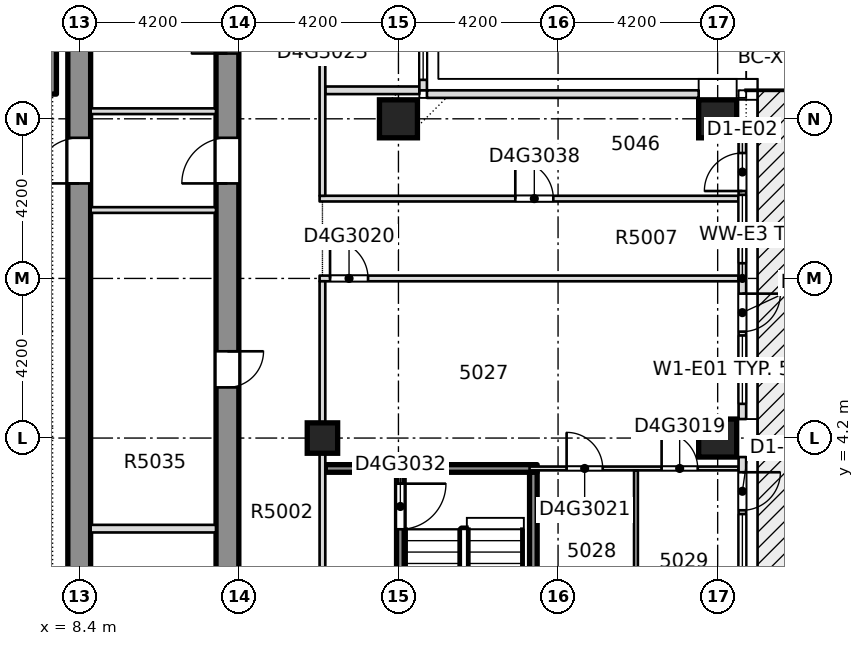
"""IFC4 building model, lengths in metres.
Left out: names, types, materials, properties, quantities, classifications, styles, units other than length and angle.
Written with IfcOpenShell. Run it as: python <this file> out.ifc"""

import sys

from ifc_helpers import new_model, si_unit, direction, frame, frame_2d, origin, origin_2d, place, context, subcontext, project, spatial, rectangle, extrude, element, fill, save


model = new_model("IFC4")
c1 = context("Model", 3, precision=1e-05, world=origin(), true_north=direction((0.0, 1.0)))
c2 = subcontext(c1, "Body", "Model", "MODEL_VIEW")
j1 = project(units=[si_unit("LENGTHUNIT", "METRE"), si_unit("PLANEANGLEUNIT", "RADIAN")], contexts=[c1])
p1 = place(None, origin())
s1 = spatial("IfcSite", under=j1, at=p1, CompositionType="ELEMENT")
p2 = place(p1, origin())
s2 = spatial("IfcBuilding", under=s1, at=p2, CompositionType="ELEMENT")
p3 = place(p2, frame((0.0, 0.0, 192.8)))
s3 = spatial("IfcBuildingStorey", under=s2, at=p3, CompositionType="ELEMENT", Elevation=192.8)
p4 = place(p3, frame((12.3, -8.4, -0.4), z_axis=(0.0, 0.0, 1.0), x_axis=(0.0, 1.0, 0.0)))
e1 = element("IfcWall", 1, at=p4, inside=s3, PredefinedType="SHEAR", context=c2, shape_type="SweptSolid", body=[
    extrude(rectangle(XDim=30.15, YDim=0.6, at=frame_2d((15.075, 0.0))), origin(), (0.0, 0.0, 1.0), 3.45),
])
p5 = place(p4, frame((5.083, 0.0, 0.4)))
e2 = element("IfcOpeningElement", 2, at=p5, cuts=e1, PredefinedType="OPENING", context=c2, shape_type="SweptSolid", body=[
    extrude(rectangle(XDim=0.95, YDim=2.1, at=frame_2d((0.475, 1.05))), frame((0.0, 0.31, 0.0), z_axis=(0.0, -1.0, 0.0), x_axis=(1.0, 0.0, 0.0)), (0.0, 0.0, 1.0), 0.62),
])
p6 = place(p4, frame((13.933, 0.0, 0.4)))
e3 = element("IfcOpeningElement", 3, at=p6, cuts=e1, PredefinedType="OPENING", context=c2, shape_type="SweptSolid", body=[
    extrude(rectangle(XDim=0.95, YDim=2.1, at=frame_2d((0.475, 1.05))), frame((0.0, 0.31, 0.0), z_axis=(0.0, -1.0, 0.0), x_axis=(1.0, 0.0, 0.0)), (0.0, 0.0, 1.0), 0.62),
])
p7 = place(p4, frame((22.719, 0.0, 0.4)))
e4 = element("IfcOpeningElement", 4, at=p7, cuts=e1, PredefinedType="OPENING", context=c2, shape_type="SweptSolid", body=[
    extrude(rectangle(XDim=0.95, YDim=2.1, at=frame_2d((0.475, 1.05))), frame((0.0, 0.31, 0.0), z_axis=(0.0, -1.0, 0.0), x_axis=(1.0, 0.0, 0.0)), (0.0, 0.0, 1.0), 0.62),
])
p8 = place(p4, frame((25.506, 0.0, 0.4)))
e5 = element("IfcOpeningElement", 5, at=p8, cuts=e1, PredefinedType="OPENING", context=c2, shape_type="SweptSolid", body=[
    extrude(rectangle(XDim=0.95, YDim=2.1, at=frame_2d((0.475, 1.05))), frame((0.0, 0.31, 0.0), z_axis=(0.0, -1.0, 0.0), x_axis=(1.0, 0.0, 0.0)), (0.0, 0.0, 1.0), 0.62),
])
p9 = place(p4, frame((27.537, 0.0, 0.4)))
e6 = element("IfcOpeningElement", 6, at=p9, cuts=e1, PredefinedType="OPENING", context=c2, shape_type="SweptSolid", body=[
    extrude(rectangle(XDim=0.95, YDim=2.1, at=frame_2d((0.475, 1.05))), frame((0.0, 0.31, 0.0), z_axis=(0.0, -1.0, 0.0), x_axis=(1.0, 0.0, 0.0)), (0.0, 0.0, 1.0), 0.62),
])
p10 = place(p4, frame((19.3, 0.0, 0.4)))
e7 = element("IfcOpeningElement", 7, at=p10, cuts=e1, PredefinedType="OPENING", context=c2, shape_type="SweptSolid", body=[
    extrude(rectangle(XDim=1.2, YDim=2.1, at=frame_2d((0.6, 1.05))), frame((0.0, 0.31, 0.0), z_axis=(0.0, -1.0, 0.0), x_axis=(1.0, 0.0, 0.0)), (0.0, 0.0, 1.0), 0.62),
])
p11 = place(p3, frame((8.4, -7.8, -0.4), z_axis=(0.0, 0.0, 1.0), x_axis=(0.0, 1.0, 0.0)))
e8 = element("IfcWall", 8, at=p11, inside=s3, PredefinedType="SHEAR", context=c2, shape_type="SweptSolid", body=[
    extrude(rectangle(XDim=28.95, YDim=0.6, at=frame_2d((14.475, 0.0))), origin(), (0.0, 0.0, 1.0), 3.45),
])
p12 = place(p11, frame((18.7, 0.0, 0.4)))
e9 = element("IfcOpeningElement", 9, at=p12, cuts=e8, PredefinedType="OPENING", context=c2, shape_type="SweptSolid", body=[
    extrude(rectangle(XDim=1.2, YDim=2.1, at=frame_2d((0.6, 1.05))), frame((0.0, 0.31, 0.0), z_axis=(0.0, -1.0, 0.0), x_axis=(1.0, 0.0, 0.0)), (0.0, 0.0, 1.0), 0.62),
])
for number, where, z_axis, x_axis in (
    (10, (25.2, 4.2, -0.4), (0.0, 0.0, 1.0), (1.0, 0.0, 0.0)),
    (11, (16.8, 12.6, -0.4), (0.0, 0.0, 1.0), (1.0, 0.0, 0.0)),
    (12, (25.2, 12.6, -0.4), (0.0, 0.0, 1.0), (1.0, 0.0, 0.0)),
):
    element("IfcColumn", number, at=place(p3, frame(where, z_axis=z_axis, x_axis=x_axis)), inside=s3, PredefinedType="COLUMN", context=c2, shape_type="SweptSolid", body=[
        extrude(rectangle(XDim=1.0, YDim=1.0, at=origin_2d()), origin(), (0.0, 0.0, 1.0), 3.45),
    ])
p13 = place(p3, frame((14.8, 4.2, -0.4), z_axis=(0.0, 0.0, 1.0), x_axis=(1.0, 0.0, 0.0)))
e13 = element("IfcColumn", 13, at=p13, inside=s3, PredefinedType="COLUMN", context=c2, shape_type="SweptSolid", body=[
    extrude(rectangle(XDim=0.8, YDim=0.8, at=origin_2d()), origin(), (0.0, 0.0, 1.0), 3.45),
])
p14 = place(p3, frame((14.875, 3.4, 0.0), z_axis=(0.0, 0.0, 1.0), x_axis=(1.0, 0.0, 0.0)))
e14 = element("IfcWall", 14, at=p14, inside=s3, PredefinedType="SOLIDWALL", context=c2, shape_type="SweptSolid", body=[
    extrude(rectangle(XDim=5.575, YDim=0.2, at=frame_2d((2.788, 0.0))), origin(), (0.0, 0.0, 1.0), 3.05),
])
p15 = place(p3, frame((20.25, 3.4, 0.0), z_axis=(0.0, 0.0, 1.0), x_axis=(1.0, 0.0, 0.0)))
e15 = element("IfcWall", 15, at=p15, inside=s3, PredefinedType="PARTITIONING", context=c2, shape_type="SweptSolid", body=[
    extrude(rectangle(XDim=5.5, YDim=0.1, at=frame_2d((2.75, 0.0))), origin(), (0.0, 0.0, 1.0), 3.05),
])
p16 = place(p15, frame((3.475, 0.0, 0.0)))
e16 = element("IfcOpeningElement", 16, at=p16, cuts=e15, PredefinedType="OPENING", context=c2, shape_type="SweptSolid", body=[
    extrude(rectangle(XDim=0.95, YDim=2.1, at=frame_2d((0.475, 1.05))), frame((0.0, 0.06, 0.0), z_axis=(0.0, -1.0, 0.0), x_axis=(1.0, 0.0, 0.0)), (0.0, 0.0, 1.0), 0.12),
])
p17 = place(p15, frame((0.975, 0.0, 0.0)))
e17 = element("IfcOpeningElement", 17, at=p17, cuts=e15, PredefinedType="OPENING", context=c2, shape_type="SweptSolid", body=[
    extrude(rectangle(XDim=0.95, YDim=2.1, at=frame_2d((0.475, 1.05))), frame((0.0, 0.06, 0.0), z_axis=(0.0, -1.0, 0.0), x_axis=(1.0, 0.0, 0.0)), (0.0, 0.0, 1.0), 0.12),
])
p18 = place(p3, frame((14.725, 8.4, 0.0), z_axis=(0.0, 0.0, 1.0), x_axis=(1.0, 0.0, 0.0)))
e18 = element("IfcWall", 18, at=p18, inside=s3, PredefinedType="PARTITIONING", context=c2, shape_type="SweptSolid", body=[
    extrude(rectangle(XDim=11.025, YDim=0.15, at=frame_2d((5.512, 0.0))), origin(), (0.0, 0.0, 1.0), 3.05),
])
p19 = place(p18, frame((0.275, 0.0, 0.0)))
e19 = element("IfcOpeningElement", 19, at=p19, cuts=e18, PredefinedType="OPENING", context=c2, shape_type="SweptSolid", body=[
    extrude(rectangle(XDim=1.0, YDim=2.1, at=frame_2d((0.5, 1.05))), frame((0.0, 0.085, 0.0), z_axis=(0.0, -1.0, 0.0), x_axis=(1.0, 0.0, 0.0)), (0.0, 0.0, 1.0), 0.17),
])
p20 = place(p3, frame((14.725, 10.5, 0.0), z_axis=(0.0, 0.0, 1.0), x_axis=(1.0, 0.0, 0.0)))
e20 = element("IfcWall", 20, at=p20, inside=s3, PredefinedType="PARTITIONING", context=c2, shape_type="SweptSolid", body=[
    extrude(rectangle(XDim=11.025, YDim=0.15, at=frame_2d((5.512, 0.0))), origin(), (0.0, 0.0, 1.0), 3.05),
])
p21 = place(p20, frame((5.15, 0.0, 0.0)))
e21 = element("IfcOpeningElement", 21, at=p21, cuts=e20, PredefinedType="OPENING", context=c2, shape_type="SweptSolid", body=[
    extrude(rectangle(XDim=1.0, YDim=2.1, at=frame_2d((0.5, 1.05))), frame((0.0, 0.085, 0.0), z_axis=(0.0, -1.0, 0.0), x_axis=(1.0, 0.0, 0.0)), (0.0, 0.0, 1.0), 0.17),
])
p22 = place(p3, frame((14.875, 13.35, 0.0), z_axis=(0.0, 0.0, 1.0), x_axis=(1.0, 0.0, 0.0)))
e22 = element("IfcWall", 22, at=p22, inside=s3, PredefinedType="PARTITIONING", context=c2, shape_type="SweptSolid", body=[
    extrude(rectangle(XDim=2.475, YDim=0.2, at=frame_2d((1.238, 0.0))), origin(), (0.0, 0.0, 1.0), 3.05),
])
p23 = place(p3, frame((14.8, -3.35, 0.0), z_axis=(0.0, 0.0, 1.0), x_axis=(0.0, 1.0, 0.0)))
e23 = element("IfcWall", 23, at=p23, inside=s3, PredefinedType="PARTITIONING", context=c2, shape_type="SweptSolid", body=[
    extrude(rectangle(XDim=11.675, YDim=0.15, at=frame_2d((5.837, 0.0))), origin(), (0.0, 0.0, 1.0), 3.05),
])
p24 = place(p23, frame((2.8, 0.0, 0.0)))
e24 = element("IfcOpeningElement", 24, at=p24, cuts=e23, PredefinedType="OPENING", context=c2, shape_type="SweptSolid", body=[
    extrude(rectangle(XDim=1.1, YDim=2.1, at=frame_2d((0.55, 1.05))), frame((0.0, 0.085, 0.0), z_axis=(0.0, -1.0, 0.0), x_axis=(1.0, 0.0, 0.0)), (0.0, 0.0, 1.0), 0.17),
])
p25 = place(p3, frame((14.8, 10.575, 0.0), z_axis=(0.0, 0.0, 1.0), x_axis=(0.0, 1.0, 0.0)))
e25 = element("IfcWall", 25, at=p25, inside=s3, PredefinedType="PARTITIONING", context=c2, shape_type="SweptSolid", body=[
    extrude(rectangle(XDim=10.975, YDim=0.15, at=frame_2d((5.488, 0.0))), origin(), (0.0, 0.0, 1.0), 3.05),
])
p26 = place(p25, frame((4.375, 0.0, 0.0)))
e26 = element("IfcOpeningElement", 26, at=p26, cuts=e25, PredefinedType="OPENING", context=c2, shape_type="SweptSolid", body=[
    extrude(rectangle(XDim=0.95, YDim=2.1, at=frame_2d((0.475, 1.05))), frame((0.0, 0.085, 0.0), z_axis=(0.0, -1.0, 0.0), x_axis=(1.0, 0.0, 0.0)), (0.0, 0.0, 1.0), 0.17),
])
p27 = place(p25, frame((8.275, 0.0, 0.0)))
e27 = element("IfcOpeningElement", 27, at=p27, cuts=e25, PredefinedType="OPENING", context=c2, shape_type="SweptSolid", body=[
    extrude(rectangle(XDim=0.95, YDim=2.1, at=frame_2d((0.475, 1.05))), frame((0.0, 0.085, 0.0), z_axis=(0.0, -1.0, 0.0), x_axis=(1.0, 0.0, 0.0)), (0.0, 0.0, 1.0), 0.17),
])
p28 = place(p3, frame((16.85, -3.35, 0.0), z_axis=(0.0, 0.0, 1.0), x_axis=(0.0, 1.0, 0.0)))
e28 = element("IfcWall", 28, at=p28, inside=s3, PredefinedType="SOLIDWALL", context=c2, shape_type="SweptSolid", body=[
    extrude(rectangle(XDim=6.65, YDim=0.2, at=frame_2d((3.325, 0.0))), origin(), (0.0, 0.0, 1.0), 3.05),
])
p29 = place(p28, frame((5.15, 0.0, 0.0)))
e29 = element("IfcOpeningElement", 29, at=p29, cuts=e28, PredefinedType="OPENING", context=c2, shape_type="SweptSolid", body=[
    extrude(rectangle(XDim=1.2, YDim=2.1, at=frame_2d((0.6, 1.05))), frame((0.0, 0.11, 0.0), z_axis=(0.0, -1.0, 0.0), x_axis=(1.0, 0.0, 0.0)), (0.0, 0.0, 1.0), 0.22),
])
p30 = place(p3, frame((20.35, -0.83, 0.0), z_axis=(0.0, 0.0, 1.0), x_axis=(0.0, 1.0, 0.0)))
e30 = element("IfcWall", 30, at=p30, inside=s3, PredefinedType="SOLIDWALL", context=c2, shape_type="SweptSolid", body=[
    extrude(rectangle(XDim=4.13, YDim=0.2, at=frame_2d((2.065, 0.0))), origin(), (0.0, 0.0, 1.0), 3.05),
])
p31 = place(p3, frame((23.05, -3.3, 0.0), z_axis=(0.0, 0.0, 1.0), x_axis=(0.0, 1.0, 0.0)))
e31 = element("IfcWall", 31, at=p31, inside=s3, PredefinedType="PARTITIONING", context=c2, shape_type="SweptSolid", body=[
    extrude(rectangle(XDim=6.65, YDim=0.1, at=frame_2d((3.325, 0.0))), origin(), (0.0, 0.0, 1.0), 3.05),
])
p32 = place(p3, frame((25.85, -3.7, 0.0), z_axis=(0.0, 0.0, 1.0), x_axis=(0.0, 1.0, 0.0)))
e32 = element("IfcWall", 32, at=p32, inside=s3, PredefinedType="STANDARD", context=c2, shape_type="SweptSolid", body=[
    extrude(rectangle(XDim=7.4, YDim=0.2, at=frame_2d((3.7, 0.0))), origin(), (0.0, 0.0, 1.0), 3.05),
])
p33 = place(p32, frame((0.4, 0.0, 0.2)))
e33 = element("IfcOpeningElement", 33, at=p33, cuts=e32, PredefinedType="OPENING", context=c2, shape_type="SweptSolid", body=[
    extrude(rectangle(XDim=1.8, YDim=2.65, at=frame_2d((0.9, 1.325))), frame((0.0, 0.11, 0.0), z_axis=(0.0, -1.0, 0.0), x_axis=(1.0, 0.0, 0.0)), (0.0, 0.0, 1.0), 0.22),
])
p34 = place(p32, frame((2.3, 0.0, 0.0)))
e34 = element("IfcOpeningElement", 34, at=p34, cuts=e32, PredefinedType="OPENING", context=c2, shape_type="SweptSolid", body=[
    extrude(rectangle(XDim=1.0, YDim=2.4, at=frame_2d((0.5, 1.2))), frame((0.0, 0.11, 0.0), z_axis=(0.0, -1.0, 0.0), x_axis=(1.0, 0.0, 0.0)), (0.0, 0.0, 1.0), 0.22),
])
p35 = place(p32, frame((4.1, 0.0, 0.2)))
e35 = element("IfcOpeningElement", 35, at=p35, cuts=e32, PredefinedType="OPENING", context=c2, shape_type="SweptSolid", body=[
    extrude(rectangle(XDim=1.8, YDim=2.65, at=frame_2d((0.9, 1.325))), frame((0.0, 0.11, 0.0), z_axis=(0.0, -1.0, 0.0), x_axis=(1.0, 0.0, 0.0)), (0.0, 0.0, 1.0), 0.22),
])
p36 = place(p32, frame((6.0, 0.0, 0.0)))
e36 = element("IfcOpeningElement", 36, at=p36, cuts=e32, PredefinedType="OPENING", context=c2, shape_type="SweptSolid", body=[
    extrude(rectangle(XDim=1.0, YDim=2.4, at=frame_2d((0.5, 1.2))), frame((0.0, 0.11, 0.0), z_axis=(0.0, -1.0, 0.0), x_axis=(1.0, 0.0, 0.0)), (0.0, 0.0, 1.0), 0.22),
])
p37 = place(p3, frame((25.85, 4.7, 0.0), z_axis=(0.0, 0.0, 1.0), x_axis=(0.0, 1.0, 0.0)))
e37 = element("IfcWall", 37, at=p37, inside=s3, PredefinedType="STANDARD", context=c2, shape_type="SweptSolid", body=[
    extrude(rectangle(XDim=7.4, YDim=0.2, at=frame_2d((3.7, 0.0))), origin(), (0.0, 0.0, 1.0), 3.05),
])
p38 = place(p37, frame((0.4, 0.0, 0.2)))
e38 = element("IfcOpeningElement", 38, at=p38, cuts=e37, PredefinedType="OPENING", context=c2, shape_type="SweptSolid", body=[
    extrude(rectangle(XDim=1.8, YDim=2.65, at=frame_2d((0.9, 1.325))), frame((0.0, 0.11, 0.0), z_axis=(0.0, -1.0, 0.0), x_axis=(1.0, 0.0, 0.0)), (0.0, 0.0, 1.0), 0.22),
])
p39 = place(p37, frame((2.3, 0.0, 0.0)))
e39 = element("IfcOpeningElement", 39, at=p39, cuts=e37, PredefinedType="OPENING", context=c2, shape_type="SweptSolid", body=[
    extrude(rectangle(XDim=1.0, YDim=2.4, at=frame_2d((0.5, 1.2))), frame((0.0, 0.11, 0.0), z_axis=(0.0, -1.0, 0.0), x_axis=(1.0, 0.0, 0.0)), (0.0, 0.0, 1.0), 0.22),
])
p40 = place(p37, frame((4.1, 0.0, 0.2)))
e40 = element("IfcOpeningElement", 40, at=p40, cuts=e37, PredefinedType="OPENING", context=c2, shape_type="SweptSolid", body=[
    extrude(rectangle(XDim=1.8, YDim=2.65, at=frame_2d((0.9, 1.325))), frame((0.0, 0.11, 0.0), z_axis=(0.0, -1.0, 0.0), x_axis=(1.0, 0.0, 0.0)), (0.0, 0.0, 1.0), 0.22),
])
p41 = place(p37, frame((6.0, 0.0, 0.0)))
e41 = element("IfcOpeningElement", 41, at=p41, cuts=e37, PredefinedType="OPENING", context=c2, shape_type="SweptSolid", body=[
    extrude(rectangle(XDim=1.0, YDim=2.4, at=frame_2d((0.5, 1.2))), frame((0.0, 0.11, 0.0), z_axis=(0.0, -1.0, 0.0), x_axis=(1.0, 0.0, 0.0)), (0.0, 0.0, 1.0), 0.22),
])
p42 = place(p3, frame((24.7, 13.25, 0.0), z_axis=(0.0, 0.0, 1.0), x_axis=(-1.0, 0.0, 0.0)))
e42 = element("IfcWall", 42, at=p42, inside=s3, PredefinedType="STANDARD", context=c2, shape_type="SweptSolid", body=[
    extrude(rectangle(XDim=7.15, YDim=0.2, at=frame_2d((3.575, 0.0))), origin(), (0.0, 0.0, 1.0), 3.05),
])
p43 = place(p3, frame((17.45, 13.35, 0.0), z_axis=(0.0, 0.0, 1.0), x_axis=(0.0, 1.0, 0.0)))
e43 = element("IfcWall", 43, at=p43, inside=s3, PredefinedType="STANDARD", context=c2, shape_type="SweptSolid", body=[
    extrude(rectangle(XDim=7.15, YDim=0.2, at=frame_2d((3.575, 0.0))), origin(), (0.0, 0.0, 1.0), 3.05),
])
p44 = place(p43, frame((0.275, 0.0, 0.2)))
e44 = element("IfcOpeningElement", 44, at=p44, cuts=e43, PredefinedType="OPENING", context=c2, shape_type="SweptSolid", body=[
    extrude(rectangle(XDim=1.8, YDim=2.65, at=frame_2d((0.9, 1.325))), frame((0.0, 0.11, 0.0), z_axis=(0.0, -1.0, 0.0), x_axis=(1.0, 0.0, 0.0)), (0.0, 0.0, 1.0), 0.22),
])
p45 = place(p43, frame((4.37, 0.0, 0.2)))
e45 = element("IfcOpeningElement", 45, at=p45, cuts=e43, PredefinedType="OPENING", context=c2, shape_type="SweptSolid", body=[
    extrude(rectangle(XDim=1.8, YDim=2.65, at=frame_2d((0.9, 1.325))), frame((0.0, 0.11, 0.0), z_axis=(0.0, -1.0, 0.0), x_axis=(1.0, 0.0, 0.0)), (0.0, 0.0, 1.0), 0.22),
])
p46 = place(p3, frame((8.701, 1.816, 0.0), z_axis=(0.0, 0.0, 1.0), x_axis=(1.0, 0.0, 0.0)))
e46 = element("IfcWall", 46, at=p46, inside=s3, PredefinedType="PARTITIONING", context=c2, shape_type="SweptSolid", body=[
    extrude(rectangle(XDim=3.298, YDim=0.2, at=frame_2d((1.649, 0.0))), origin(), (0.0, 0.0, 1.0), 3.05),
])
for number, where, z_axis, x_axis in (
    (47, (8.701, 10.2, 0.0), (0.0, 0.0, 1.0), (1.0, 0.0, 0.0)),
    (48, (8.701, 12.8, 0.0), (0.0, 0.0, 1.0), (1.0, 0.0, 0.0)),
):
    element("IfcWall", number, at=place(p3, frame(where, z_axis=z_axis, x_axis=x_axis)), inside=s3, PredefinedType="PARTITIONING", context=c2, shape_type="SweptSolid", body=[
        extrude(rectangle(XDim=3.298, YDim=0.15, at=frame_2d((1.649, 0.0))), origin(), (0.0, 0.0, 1.0), 3.05),
    ])
p47 = place(p3, frame((7.7, 13.25, 0.0), z_axis=(0.0, 0.0, 1.0), x_axis=(0.0, 1.0, 0.0)))
e49 = element("IfcWall", 49, at=p47, inside=s3, PredefinedType="SOLIDWALL", context=c2, shape_type="SweptSolid", body=[
    extrude(rectangle(XDim=7.6, YDim=0.2, at=frame_2d((3.8, 0.0))), origin(), (0.0, 0.0, 1.0), 3.05),
])
p48 = place(p16, origin())
e50 = element("IfcDoor", 50, at=p48, inside=s3, OperationType="SINGLE_SWING_RIGHT", PredefinedType="DOOR", context=c2, shape_type="SweptSolid", body=[
    extrude(rectangle(XDim=0.95, YDim=2.1, at=frame_2d((0.475, 1.05))), frame((0.0, 0.025, 0.0), z_axis=(0.0, -1.0, 0.0), x_axis=(1.0, 0.0, 0.0)), (0.0, 0.0, 1.0), 0.05),
])
fill(e16, e50)
p49 = place(p19, origin())
e51 = element("IfcDoor", 51, at=p49, inside=s3, OperationType="SINGLE_SWING_RIGHT", PredefinedType="DOOR", context=c2, shape_type="SweptSolid", body=[
    extrude(rectangle(XDim=1.0, YDim=2.1, at=frame_2d((0.5, 1.05))), frame((0.0, 0.025, 0.0), z_axis=(0.0, -1.0, 0.0), x_axis=(1.0, 0.0, 0.0)), (0.0, 0.0, 1.0), 0.05),
])
fill(e19, e51)
p50 = place(p17, origin())
e52 = element("IfcDoor", 52, at=p50, inside=s3, OperationType="SINGLE_SWING_RIGHT", PredefinedType="DOOR", context=c2, shape_type="SweptSolid", body=[
    extrude(rectangle(XDim=0.95, YDim=2.1, at=frame_2d((0.475, 1.05))), frame((0.0, 0.025, 0.0), z_axis=(0.0, -1.0, 0.0), x_axis=(1.0, 0.0, 0.0)), (0.0, 0.0, 1.0), 0.05),
])
fill(e17, e52)
p51 = place(p29, origin())
e53 = element("IfcDoor", 53, at=p51, inside=s3, OperationType="SINGLE_SWING_LEFT", PredefinedType="DOOR", context=c2, shape_type="SweptSolid", body=[
    extrude(rectangle(XDim=1.2, YDim=2.1, at=frame_2d((0.6, 1.05))), frame((0.0, 0.025, 0.0), z_axis=(0.0, -1.0, 0.0), x_axis=(1.0, 0.0, 0.0)), (0.0, 0.0, 1.0), 0.05),
])
fill(e29, e53)
p52 = place(p21, origin())
e54 = element("IfcDoor", 54, at=p52, inside=s3, OperationType="SINGLE_SWING_RIGHT", PredefinedType="DOOR", context=c2, shape_type="SweptSolid", body=[
    extrude(rectangle(XDim=1.0, YDim=2.1, at=frame_2d((0.5, 1.05))), frame((0.0, 0.025, 0.0), z_axis=(0.0, -1.0, 0.0), x_axis=(1.0, 0.0, 0.0)), (0.0, 0.0, 1.0), 0.05),
])
fill(e21, e54)
p53 = place(p35, origin())
e55 = element("IfcWindow", 55, at=p53, inside=s3, PartitioningType="SINGLE_PANEL", PredefinedType="WINDOW", context=c2, shape_type="SweptSolid", body=[
    extrude(rectangle(XDim=1.8, YDim=2.65, at=frame_2d((0.9, 1.325))), frame((0.0, 0.03, 0.0), z_axis=(0.0, -1.0, 0.0), x_axis=(1.0, 0.0, 0.0)), (0.0, 0.0, 1.0), 0.06),
])
fill(e35, e55)
p54 = place(p36, origin())
e56 = element("IfcDoor", 56, at=p54, inside=s3, OperationType="SINGLE_SWING_LEFT", PredefinedType="DOOR", context=c2, shape_type="SweptSolid", body=[
    extrude(rectangle(XDim=1.0, YDim=2.4, at=frame_2d((0.5, 1.2))), frame((0.0, 0.025, 0.0), z_axis=(0.0, -1.0, 0.0), x_axis=(1.0, 0.0, 0.0)), (0.0, 0.0, 1.0), 0.05),
])
fill(e36, e56)
p55 = place(p38, origin())
e57 = element("IfcWindow", 57, at=p55, inside=s3, PartitioningType="SINGLE_PANEL", PredefinedType="WINDOW", context=c2, shape_type="SweptSolid", body=[
    extrude(rectangle(XDim=1.8, YDim=2.65, at=frame_2d((0.9, 1.325))), frame((0.0, 0.03, 0.0), z_axis=(0.0, -1.0, 0.0), x_axis=(1.0, 0.0, 0.0)), (0.0, 0.0, 1.0), 0.06),
])
fill(e38, e57)
p56 = place(p39, origin())
e58 = element("IfcDoor", 58, at=p56, inside=s3, OperationType="SINGLE_SWING_LEFT", PredefinedType="DOOR", context=c2, shape_type="SweptSolid", body=[
    extrude(rectangle(XDim=1.0, YDim=2.4, at=frame_2d((0.5, 1.2))), frame((0.0, 0.025, 0.0), z_axis=(0.0, -1.0, 0.0), x_axis=(1.0, 0.0, 0.0)), (0.0, 0.0, 1.0), 0.05),
])
fill(e39, e58)
p57 = place(p40, origin())
e59 = element("IfcWindow", 59, at=p57, inside=s3, PartitioningType="SINGLE_PANEL", PredefinedType="WINDOW", context=c2, shape_type="SweptSolid", body=[
    extrude(rectangle(XDim=1.8, YDim=2.65, at=frame_2d((0.9, 1.325))), frame((0.0, 0.03, 0.0), z_axis=(0.0, -1.0, 0.0), x_axis=(1.0, 0.0, 0.0)), (0.0, 0.0, 1.0), 0.06),
])
fill(e40, e59)
p58 = place(p41, origin())
e60 = element("IfcDoor", 60, at=p58, inside=s3, OperationType="SINGLE_SWING_LEFT", PredefinedType="DOOR", context=c2, shape_type="SweptSolid", body=[
    extrude(rectangle(XDim=1.0, YDim=2.4, at=frame_2d((0.5, 1.2))), frame((0.0, 0.025, 0.0), z_axis=(0.0, -1.0, 0.0), x_axis=(1.0, 0.0, 0.0)), (0.0, 0.0, 1.0), 0.05),
])
fill(e41, e60)
p59 = place(p44, origin())
e61 = element("IfcWindow", 61, at=p59, inside=s3, PartitioningType="SINGLE_PANEL", PredefinedType="WINDOW", context=c2, shape_type="SweptSolid", body=[
    extrude(rectangle(XDim=1.8, YDim=2.65, at=frame_2d((0.9, 1.325))), frame((0.0, 0.03, 0.0), z_axis=(0.0, -1.0, 0.0), x_axis=(1.0, 0.0, 0.0)), (0.0, 0.0, 1.0), 0.06),
])
fill(e44, e61)
p60 = place(p6, origin())
e62 = element("IfcDoor", 62, at=p60, inside=s3, OperationType="SINGLE_SWING_LEFT", PredefinedType="DOOR", context=c2, shape_type="SweptSolid", body=[
    extrude(rectangle(XDim=0.95, YDim=2.1, at=frame_2d((0.475, 1.05))), frame((0.0, 0.025, 0.0), z_axis=(0.0, -1.0, 0.0), x_axis=(1.0, 0.0, 0.0)), (0.0, 0.0, 1.0), 0.05),
])
fill(e3, e62)
p61 = place(p7, origin())
e63 = element("IfcDoor", 63, at=p61, inside=s3, OperationType="SINGLE_SWING_LEFT", PredefinedType="DOOR", context=c2, shape_type="SweptSolid", body=[
    extrude(rectangle(XDim=0.95, YDim=2.1, at=frame_2d((0.475, 1.05))), frame((0.0, 0.025, 0.0), z_axis=(0.0, -1.0, 0.0), x_axis=(1.0, 0.0, 0.0)), (0.0, 0.0, 1.0), 0.05),
])
fill(e4, e63)
p62 = place(p10, origin())
e64 = element("IfcDoor", 64, at=p62, inside=s3, OperationType="SINGLE_SWING_LEFT", PredefinedType="DOOR", context=c2, shape_type="SweptSolid", body=[
    extrude(rectangle(XDim=1.2, YDim=2.1, at=frame_2d((0.6, 1.05))), frame((0.0, 0.025, 0.0), z_axis=(0.0, -1.0, 0.0), x_axis=(1.0, 0.0, 0.0)), (0.0, 0.0, 1.0), 0.05),
])
fill(e7, e64)
p63 = place(p12, origin())
e65 = element("IfcDoor", 65, at=p63, inside=s3, OperationType="SINGLE_SWING_LEFT", PredefinedType="DOOR", context=c2, shape_type="SweptSolid", body=[
    extrude(rectangle(XDim=1.2, YDim=2.1, at=frame_2d((0.6, 1.05))), frame((0.0, 0.025, 0.0), z_axis=(0.0, -1.0, 0.0), x_axis=(1.0, 0.0, 0.0)), (0.0, 0.0, 1.0), 0.05),
])
fill(e9, e65)
save(model, sys.argv[1])
